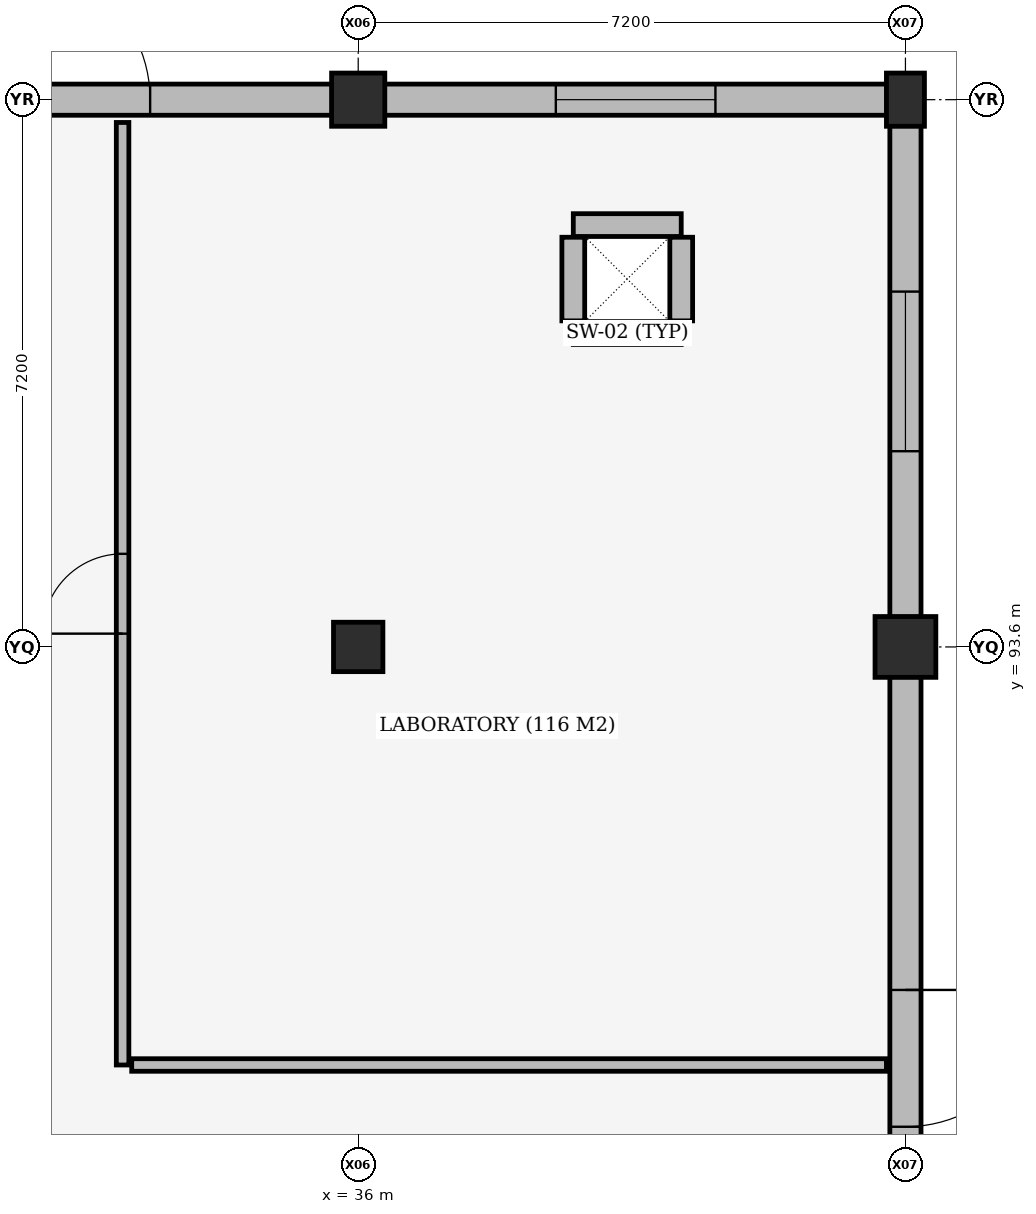
"""IFC4 building model, lengths in metres.
Left out: names, types, materials, properties, quantities, classifications, styles, units other than length and angle.
Written with IfcOpenShell. Run it as: python <this file> out.ifc"""

import sys

from ifc_helpers import new_model, si_unit, direction, frame, frame_2d, origin, origin_2d, place, context, subcontext, project, spatial, rectangle, extrude, element, fill, save


model = new_model("IFC4")
c1 = context("Model", 3, precision=1e-05, world=origin(), true_north=direction((0.0, 1.0)))
c2 = subcontext(c1, "Body", "Model", "MODEL_VIEW")
j1 = project(units=[si_unit("LENGTHUNIT", "METRE"), si_unit("PLANEANGLEUNIT", "RADIAN")], contexts=[c1])
p1 = place(None, origin())
s1 = spatial("IfcSite", under=j1, at=p1, CompositionType="ELEMENT")
p2 = place(p1, origin())
s2 = spatial("IfcBuilding", under=s1, at=p2, CompositionType="ELEMENT")
p3 = place(p2, origin())
s3 = spatial("IfcBuildingStorey", under=s2, at=p3, CompositionType="ELEMENT", Elevation=0.0)
p4 = place(p3, frame((38.83, 97.73, 0.0), z_axis=(0.0, 0.0, 1.0), x_axis=(1.0, 0.0, 0.0)))
e1 = element("IfcWall", 1, at=p4, inside=s3, PredefinedType="SHEAR", context=c2, shape_type="SweptSolid", body=[
    extrude(rectangle(XDim=1.42, YDim=0.3, at=frame_2d((0.71, 0.0))), origin(), (0.0, 0.0, 1.0), 5.16),
])
p5 = place(p3, frame((40.25, 97.89, 0.0), z_axis=(0.0, 0.0, 1.0), x_axis=(0.0, 1.0, 0.0)))
e2 = element("IfcWall", 2, at=p5, inside=s3, PredefinedType="SHEAR", context=c2, shape_type="SweptSolid", body=[
    extrude(rectangle(XDim=1.1, YDim=0.3, at=frame_2d((0.55, 0.0))), origin(), (0.0, 0.0, 1.0), 5.16),
])
p6 = place(p3, frame((40.25, 99.15, 0.0), z_axis=(0.0, 0.0, 1.0), x_axis=(-1.0, 0.0, 0.0)))
e3 = element("IfcWall", 3, at=p6, inside=s3, PredefinedType="SHEAR", context=c2, shape_type="SweptSolid", body=[
    extrude(rectangle(XDim=1.42, YDim=0.3, at=frame_2d((0.71, 0.0))), origin(), (0.0, 0.0, 1.0), 5.16),
])
p7 = place(p3, frame((38.83, 98.99, 0.0), z_axis=(0.0, 0.0, 1.0), x_axis=(0.0, -1.0, 0.0)))
e4 = element("IfcWall", 4, at=p7, inside=s3, PredefinedType="SHEAR", context=c2, shape_type="SweptSolid", body=[
    extrude(rectangle(XDim=1.1, YDim=0.3, at=frame_2d((0.55, 0.0))), origin(), (0.0, 0.0, 1.0), 5.16),
])
p8 = place(p3, frame((36.0, 93.6, 0.0), z_axis=(0.0, 0.0, 1.0), x_axis=(1.0, 0.0, 0.0)))
e5 = element("IfcColumn", 5, at=p8, inside=s3, PredefinedType="COLUMN", context=c2, shape_type="SweptSolid", body=[
    extrude(rectangle(XDim=0.65, YDim=0.65, at=origin_2d()), origin(), (0.0, 0.0, 1.0), 5.1),
])
p9 = place(p3, frame((36.0, 100.8, 0.0), z_axis=(0.0, 0.0, 1.0), x_axis=(1.0, 0.0, 0.0)))
e6 = element("IfcColumn", 6, at=p9, inside=s3, PredefinedType="COLUMN", context=c2, shape_type="SweptSolid", body=[
    extrude(rectangle(XDim=0.7, YDim=0.7, at=origin_2d()), origin(), (0.0, 0.0, 1.0), 5.1),
])
p10 = place(p3, frame((43.2, 93.6, 0.0), z_axis=(0.0, 0.0, 1.0), x_axis=(1.0, 0.0, 0.0)))
e7 = element("IfcColumn", 7, at=p10, inside=s3, PredefinedType="COLUMN", context=c2, shape_type="SweptSolid", body=[
    extrude(rectangle(XDim=0.8, YDim=0.8, at=origin_2d()), origin(), (0.0, 0.0, 1.0), 5.1),
])
p11 = place(p3, frame((43.2, 100.8, 0.0), z_axis=(0.0, 0.0, 1.0), x_axis=(1.0, 0.0, 0.0)))
e8 = element("IfcColumn", 8, at=p11, inside=s3, PredefinedType="COLUMN", context=c2, shape_type="SweptSolid", body=[
    extrude(rectangle(XDim=0.5, YDim=0.7, at=origin_2d()), origin(), (0.0, 0.0, 1.0), 5.1),
])
p12 = place(p3, frame((29.067, 100.8, 0.0), z_axis=(0.0, 0.0, 1.0), x_axis=(1.0, 0.0, 0.0)))
e9 = element("IfcWall", 9, at=p12, inside=s3, PredefinedType="STANDARD", context=c2, shape_type="SweptSolid", body=[
    extrude(rectangle(XDim=6.591, YDim=0.41, at=frame_2d((3.295, 0.0))), origin(), (0.0, 0.0, 1.0), 4.35),
])
p13 = place(p12, frame((2.396, 0.0, 0.0)))
e10 = element("IfcOpeningElement", 10, at=p13, cuts=e9, PredefinedType="OPENING", context=c2, shape_type="SweptSolid", body=[
    extrude(rectangle(XDim=1.8, YDim=2.2, at=frame_2d((0.9, 1.1))), frame((0.0, 0.215, 0.0), z_axis=(0.0, -1.0, 0.0), x_axis=(1.0, 0.0, 0.0)), (0.0, 0.0, 1.0), 0.43),
])
p14 = place(p3, frame((36.342, 100.8, 0.0), z_axis=(0.0, 0.0, 1.0), x_axis=(1.0, 0.0, 0.0)))
e11 = element("IfcWall", 11, at=p14, inside=s3, PredefinedType="STANDARD", context=c2, shape_type="SweptSolid", body=[
    extrude(rectangle(XDim=6.616, YDim=0.41, at=frame_2d((3.308, 0.0))), origin(), (0.0, 0.0, 1.0), 4.3),
])
p15 = place(p14, frame((2.258, 0.0, 0.8)))
e12 = element("IfcOpeningElement", 12, at=p15, cuts=e11, PredefinedType="OPENING", context=c2, shape_type="SweptSolid", body=[
    extrude(rectangle(XDim=2.1, YDim=3.0, at=frame_2d((1.05, 1.5))), frame((0.0, 0.215, 0.0), z_axis=(0.0, -1.0, 0.0), x_axis=(1.0, 0.0, 0.0)), (0.0, 0.0, 1.0), 0.43),
])
p16 = place(p3, frame((43.2, 93.208, 0.0), z_axis=(0.0, 0.0, 1.0), x_axis=(0.0, -1.0, 0.0)))
e13 = element("IfcWall", 13, at=p16, inside=s3, PredefinedType="STANDARD", context=c2, shape_type="SweptSolid", body=[
    extrude(rectangle(XDim=10.041, YDim=0.41, at=frame_2d((5.021, 0.0))), origin(), (0.0, 0.0, 1.0), 4.45),
])
p17 = place(p16, frame((4.121, 0.0, 0.0)))
e14 = element("IfcOpeningElement", 14, at=p17, cuts=e13, PredefinedType="OPENING", context=c2, shape_type="SweptSolid", body=[
    extrude(rectangle(XDim=1.8, YDim=2.2, at=frame_2d((0.9, 1.1))), frame((0.0, 0.215, 0.0), z_axis=(0.0, -1.0, 0.0), x_axis=(1.0, 0.0, 0.0)), (0.0, 0.0, 1.0), 0.43),
])
p18 = place(p3, frame((43.2, 100.458, 0.0), z_axis=(0.0, 0.0, 1.0), x_axis=(0.0, -1.0, 0.0)))
e15 = element("IfcWall", 15, at=p18, inside=s3, PredefinedType="STANDARD", context=c2, shape_type="SweptSolid", body=[
    extrude(rectangle(XDim=6.466, YDim=0.41, at=frame_2d((3.233, 0.0))), origin(), (0.0, 0.0, 1.0), 4.4),
])
p19 = place(p18, frame((2.183, 0.0, 0.8)))
e16 = element("IfcOpeningElement", 16, at=p19, cuts=e15, PredefinedType="OPENING", context=c2, shape_type="SweptSolid", body=[
    extrude(rectangle(XDim=2.1, YDim=3.0, at=frame_2d((1.05, 1.5))), frame((0.0, 0.215, 0.0), z_axis=(0.0, -1.0, 0.0), x_axis=(1.0, 0.0, 0.0)), (0.0, 0.0, 1.0), 0.43),
])
p20 = place(p3, frame((32.9, 88.1, 0.0), z_axis=(0.0, 0.0, 1.0), x_axis=(0.0, 1.0, 0.0)))
e17 = element("IfcWall", 17, at=p20, inside=s3, PredefinedType="PARTITIONING", context=c2, shape_type="SweptSolid", body=[
    extrude(rectangle(XDim=12.4, YDim=0.165, at=frame_2d((6.2, 0.0))), origin(), (0.0, 0.0, 1.0), 4.4),
])
p21 = place(p20, frame((5.675, 0.0, 0.0)))
e18 = element("IfcOpeningElement", 18, at=p21, cuts=e17, PredefinedType="OPENING", context=c2, shape_type="SweptSolid", body=[
    extrude(rectangle(XDim=1.05, YDim=2.2, at=frame_2d((0.525, 1.1))), frame((0.0, 0.093, 0.0), z_axis=(0.0, -1.0, 0.0), x_axis=(1.0, 0.0, 0.0)), (0.0, 0.0, 1.0), 0.185),
])
p22 = place(p3, frame((33.02, 88.1, 0.0), z_axis=(0.0, 0.0, 1.0), x_axis=(1.0, 0.0, 0.0)))
e19 = element("IfcWall", 19, at=p22, inside=s3, PredefinedType="PARTITIONING", context=c2, shape_type="SweptSolid", body=[
    extrude(rectangle(XDim=9.93, YDim=0.165, at=frame_2d((4.965, 0.0))), origin(), (0.0, 0.0, 1.0), 4.3),
])
p23 = place(p13, origin())
e20 = element("IfcDoor", 20, at=p23, inside=s3, OperationType="DOUBLE_DOOR_SINGLE_SWING", PredefinedType="DOOR", context=c2, shape_type="SweptSolid", body=[
    extrude(rectangle(XDim=1.8, YDim=2.2, at=frame_2d((0.9, 1.1))), frame((0.0, 0.025, 0.0), z_axis=(0.0, -1.0, 0.0), x_axis=(1.0, 0.0, 0.0)), (0.0, 0.0, 1.0), 0.05),
])
fill(e10, e20)
p24 = place(p15, origin())
e21 = element("IfcWindow", 21, at=p24, inside=s3, PartitioningType="DOUBLE_PANEL_VERTICAL", PredefinedType="WINDOW", context=c2, shape_type="SweptSolid", body=[
    extrude(rectangle(XDim=2.1, YDim=3.0, at=frame_2d((1.05, 1.5))), frame((0.0, 0.03, 0.0), z_axis=(0.0, -1.0, 0.0), x_axis=(1.0, 0.0, 0.0)), (0.0, 0.0, 1.0), 0.06),
])
fill(e12, e21)
p25 = place(p17, origin())
e22 = element("IfcDoor", 22, at=p25, inside=s3, OperationType="DOUBLE_DOOR_SINGLE_SWING", PredefinedType="DOOR", context=c2, shape_type="SweptSolid", body=[
    extrude(rectangle(XDim=1.8, YDim=2.2, at=frame_2d((0.9, 1.1))), frame((0.0, 0.025, 0.0), z_axis=(0.0, -1.0, 0.0), x_axis=(1.0, 0.0, 0.0)), (0.0, 0.0, 1.0), 0.05),
])
fill(e14, e22)
p26 = place(p19, origin())
e23 = element("IfcWindow", 23, at=p26, inside=s3, PartitioningType="DOUBLE_PANEL_VERTICAL", PredefinedType="WINDOW", context=c2, shape_type="SweptSolid", body=[
    extrude(rectangle(XDim=2.1, YDim=3.0, at=frame_2d((1.05, 1.5))), frame((0.0, 0.03, 0.0), z_axis=(0.0, -1.0, 0.0), x_axis=(1.0, 0.0, 0.0)), (0.0, 0.0, 1.0), 0.06),
])
fill(e16, e23)
p27 = place(p21, origin())
e24 = element("IfcDoor", 24, at=p27, inside=s3, OperationType="SINGLE_SWING_LEFT", PredefinedType="DOOR", context=c2, shape_type="SweptSolid", body=[
    extrude(rectangle(XDim=1.05, YDim=2.2, at=frame_2d((0.525, 1.1))), frame((0.0, 0.025, 0.0), z_axis=(0.0, -1.0, 0.0), x_axis=(1.0, 0.0, 0.0)), (0.0, 0.0, 1.0), 0.05),
])
fill(e18, e24)
save(model, sys.argv[1])
